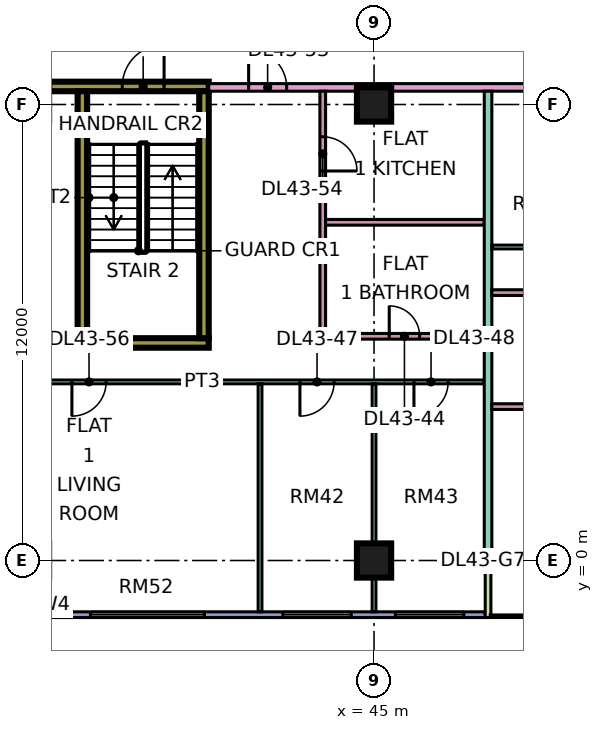
"""IFC4 building model, lengths in metres.
Left out: names, types, materials, properties, quantities, classifications, styles, units other than length and angle.
Written with IfcOpenShell. Run it as: python <this file> out.ifc"""

import sys

from ifc_helpers import new_model, si_unit, direction, frame, frame_2d, origin, origin_2d, place, context, subcontext, project, spatial, rectangle, extrude, element, fill, save


model = new_model("IFC4")
c1 = context("Model", 3, precision=1e-05, world=origin(), true_north=direction((0.0, 1.0)))
c2 = subcontext(c1, "Body", "Model", "MODEL_VIEW")
j1 = project(units=[si_unit("LENGTHUNIT", "METRE"), si_unit("PLANEANGLEUNIT", "RADIAN")], contexts=[c1])
p1 = place(None, origin())
s1 = spatial("IfcSite", under=j1, at=p1, CompositionType="ELEMENT")
p2 = place(p1, origin())
s2 = spatial("IfcBuilding", under=s1, at=p2, CompositionType="ELEMENT")
p3 = place(p2, frame((0.0, 0.0, 187.4)))
s3 = spatial("IfcBuildingStorey", under=s2, at=p3, CompositionType="ELEMENT", Elevation=187.4)
for number, where, z_axis, x_axis in (
    (1, (45.0, 0.0, 0.0), (0.0, 0.0, 1.0), (1.0, 0.0, 0.0)),
    (2, (45.0, 12.0, 0.0), (0.0, 0.0, 1.0), (1.0, 0.0, 0.0)),
):
    element("IfcColumn", number, at=place(p3, frame(where, z_axis=z_axis, x_axis=x_axis)), inside=s3, PredefinedType="COLUMN", context=c2, shape_type="SweptSolid", body=[
        extrude(rectangle(XDim=0.9, YDim=0.9, at=origin_2d()), origin(), (0.0, 0.0, 1.0), 3.75),
    ])
p4 = place(p3, frame((37.2, 5.725, 0.0), z_axis=(0.0, 0.0, 1.0), x_axis=(1.0, 0.0, 0.0)))
e3 = element("IfcWall", 3, at=p4, inside=s3, PredefinedType="SHEAR", context=c2, shape_type="SweptSolid", body=[
    extrude(rectangle(XDim=3.45, YDim=0.25, at=frame_2d((1.725, 0.0))), origin(), (0.0, 0.0, 1.0), 3.75),
])
p5 = place(p3, frame((36.45, 12.475, 0.0), z_axis=(0.0, 0.0, 1.0), x_axis=(1.0, 0.0, 0.0)))
e4 = element("IfcWall", 4, at=p5, inside=s3, PredefinedType="SHEAR", context=c2, shape_type="SweptSolid", body=[
    extrude(rectangle(XDim=4.2, YDim=0.25, at=frame_2d((2.1, 0.0))), origin(), (0.0, 0.0, 1.0), 3.75),
])
p6 = place(p5, frame((1.925, 0.0, 0.0)))
e5 = element("IfcOpeningElement", 5, at=p6, cuts=e4, PredefinedType="OPENING", context=c2, shape_type="SweptSolid", body=[
    extrude(rectangle(XDim=1.1, YDim=2.2, at=frame_2d((0.55, 1.1))), frame((0.0, 0.135, 0.0), z_axis=(0.0, -1.0, 0.0), x_axis=(1.0, 0.0, 0.0)), (0.0, 0.0, 1.0), 0.27),
])
for number, where, z_axis, x_axis in (
    (6, (37.325, 5.85, 0.0), (0.0, 0.0, 1.0), (0.0, 1.0, 0.0)),
    (7, (40.525, 5.85, 0.0), (0.0, 0.0, 1.0), (0.0, 1.0, 0.0)),
):
    element("IfcWall", number, at=place(p3, frame(where, z_axis=z_axis, x_axis=x_axis)), inside=s3, PredefinedType="SHEAR", context=c2, shape_type="SweptSolid", body=[
        extrude(rectangle(XDim=6.5, YDim=0.25, at=frame_2d((3.25, 0.0))), origin(), (0.0, 0.0, 1.0), 3.75),
    ])
p7 = place(p3, frame((36.075, -1.425, 0.0), z_axis=(0.0, 0.0, 1.0), x_axis=(1.0, 0.0, 0.0)))
e8 = element("IfcWall", 8, at=p7, inside=s3, PredefinedType="SOLIDWALL", context=c2, shape_type="SweptSolid", body=[
    extrude(rectangle(XDim=11.85, YDim=0.15, at=frame_2d((5.925, 0.0))), origin(), (0.0, 0.0, 1.0), 3.35),
])
p8 = place(p7, frame((1.462, 0.0, 0.45)))
e9 = element("IfcOpeningElement", 9, at=p8, cuts=e8, PredefinedType="OPENING", context=c2, shape_type="SweptSolid", body=[
    extrude(rectangle(XDim=3.0, YDim=2.4, at=frame_2d((1.5, 1.2))), frame((0.0, 0.085, 0.0), z_axis=(0.0, -1.0, 0.0), x_axis=(1.0, 0.0, 0.0)), (0.0, 0.0, 1.0), 0.17),
])
p9 = place(p7, frame((6.525, 0.0, 0.45)))
e10 = element("IfcOpeningElement", 10, at=p9, cuts=e8, PredefinedType="OPENING", context=c2, shape_type="SweptSolid", body=[
    extrude(rectangle(XDim=1.8, YDim=2.4, at=frame_2d((0.9, 1.2))), frame((0.0, 0.085, 0.0), z_axis=(0.0, -1.0, 0.0), x_axis=(1.0, 0.0, 0.0)), (0.0, 0.0, 1.0), 0.17),
])
p10 = place(p7, frame((9.488, 0.0, 0.45)))
e11 = element("IfcOpeningElement", 11, at=p10, cuts=e8, PredefinedType="OPENING", context=c2, shape_type="SweptSolid", body=[
    extrude(rectangle(XDim=1.8, YDim=2.4, at=frame_2d((0.9, 1.2))), frame((0.0, 0.085, 0.0), z_axis=(0.0, -1.0, 0.0), x_axis=(1.0, 0.0, 0.0)), (0.0, 0.0, 1.0), 0.17),
])
p11 = place(p3, frame((48.075, 0.0, 0.0), z_axis=(0.0, 0.0, 1.0), x_axis=(1.0, 0.0, 0.0)))
e12 = element("IfcWall", 12, at=p11, inside=s3, PredefinedType="SOLIDWALL", context=c2, shape_type="SweptSolid", body=[
    extrude(rectangle(XDim=13.35, YDim=0.15, at=frame_2d((6.675, 0.0))), origin(), (0.0, 0.0, 1.0), 3.35),
])
p12 = place(p11, frame((1.788, 0.0, 0.0)))
e13 = element("IfcOpeningElement", 13, at=p12, cuts=e12, PredefinedType="OPENING", context=c2, shape_type="SweptSolid", body=[
    extrude(rectangle(XDim=1.8, YDim=2.4, at=frame_2d((0.9, 1.2))), frame((0.0, 0.085, 0.0), z_axis=(0.0, -1.0, 0.0), x_axis=(1.0, 0.0, 0.0)), (0.0, 0.0, 1.0), 0.17),
])
p13 = place(p11, frame((7.7, 0.0, 0.45)))
e14 = element("IfcOpeningElement", 14, at=p13, cuts=e12, PredefinedType="OPENING", context=c2, shape_type="SweptSolid", body=[
    extrude(rectangle(XDim=3.0, YDim=2.4, at=frame_2d((1.5, 1.2))), frame((0.0, 0.085, 0.0), z_axis=(0.0, -1.0, 0.0), x_axis=(1.0, 0.0, 0.0)), (0.0, 0.0, 1.0), 0.17),
])
p14 = place(p11, frame((12.188, 0.0, 0.45)))
e15 = element("IfcOpeningElement", 15, at=p14, cuts=e12, PredefinedType="OPENING", context=c2, shape_type="SweptSolid", body=[
    extrude(rectangle(XDim=0.9, YDim=2.4, at=frame_2d((0.45, 1.2))), frame((0.0, 0.085, 0.0), z_axis=(0.0, -1.0, 0.0), x_axis=(1.0, 0.0, 0.0)), (0.0, 0.0, 1.0), 0.17),
])
p15 = place(p3, frame((48.0, -1.5, 0.0), z_axis=(0.0, 0.0, 1.0), x_axis=(0.0, 1.0, 0.0)))
e16 = element("IfcWall", 16, at=p15, inside=s3, PredefinedType="SOLIDWALL", context=c2, shape_type="SweptSolid", body=[
    extrude(rectangle(XDim=1.5, YDim=0.15, at=frame_2d((0.75, 0.0))), origin(), (0.0, 0.0, 1.0), 3.35),
])
p16 = place(p3, frame((33.05, 4.7, 0.0), z_axis=(0.0, 0.0, 1.0), x_axis=(1.0, 0.0, 0.0)))
e17 = element("IfcWall", 17, at=p16, inside=s3, PredefinedType="PARTITIONING", context=c2, shape_type="SweptSolid", body=[
    extrude(rectangle(XDim=14.85, YDim=0.1, at=frame_2d((7.425, 0.0))), origin(), (0.0, 0.0, 1.0), 3.35),
])
p17 = place(p16, frame((10.0, 0.0, 0.0)))
e18 = element("IfcOpeningElement", 18, at=p17, cuts=e17, PredefinedType="OPENING", context=c2, shape_type="SweptSolid", body=[
    extrude(rectangle(XDim=0.9, YDim=2.1, at=frame_2d((0.45, 1.05))), frame((0.0, 0.06, 0.0), z_axis=(0.0, -1.0, 0.0), x_axis=(1.0, 0.0, 0.0)), (0.0, 0.0, 1.0), 0.12),
])
p18 = place(p16, frame((13.0, 0.0, 0.0)))
e19 = element("IfcOpeningElement", 19, at=p18, cuts=e17, PredefinedType="OPENING", context=c2, shape_type="SweptSolid", body=[
    extrude(rectangle(XDim=0.9, YDim=2.1, at=frame_2d((0.45, 1.05))), frame((0.0, 0.06, 0.0), z_axis=(0.0, -1.0, 0.0), x_axis=(1.0, 0.0, 0.0)), (0.0, 0.0, 1.0), 0.12),
])
p19 = place(p16, frame((4.0, 0.0, 0.0)))
e20 = element("IfcOpeningElement", 20, at=p19, cuts=e17, PredefinedType="OPENING", context=c2, shape_type="SweptSolid", body=[
    extrude(rectangle(XDim=0.9, YDim=2.1, at=frame_2d((0.45, 1.05))), frame((0.0, 0.06, 0.0), z_axis=(0.0, -1.0, 0.0), x_axis=(1.0, 0.0, 0.0)), (0.0, 0.0, 1.0), 0.12),
])
p20 = place(p3, frame((40.65, 12.45, 0.0), z_axis=(0.0, 0.0, 1.0), x_axis=(1.0, 0.0, 0.0)))
e21 = element("IfcWall", 21, at=p20, inside=s3, PredefinedType="PARTITIONING", context=c2, shape_type="SweptSolid", body=[
    extrude(rectangle(XDim=22.35, YDim=0.2, at=frame_2d((11.175, 0.0))), origin(), (0.0, 0.0, 1.0), 3.35),
])
p21 = place(p20, frame((10.8, 0.0, 0.0)))
e22 = element("IfcOpeningElement", 22, at=p21, cuts=e21, PredefinedType="OPENING", context=c2, shape_type="SweptSolid", body=[
    extrude(rectangle(XDim=1.0, YDim=2.1, at=frame_2d((0.5, 1.05))), frame((0.0, 0.11, 0.0), z_axis=(0.0, -1.0, 0.0), x_axis=(1.0, 0.0, 0.0)), (0.0, 0.0, 1.0), 0.22),
])
p22 = place(p20, frame((1.05, 0.0, 0.0)))
e23 = element("IfcOpeningElement", 23, at=p22, cuts=e21, PredefinedType="OPENING", context=c2, shape_type="SweptSolid", body=[
    extrude(rectangle(XDim=1.0, YDim=2.1, at=frame_2d((0.5, 1.05))), frame((0.0, 0.11, 0.0), z_axis=(0.0, -1.0, 0.0), x_axis=(1.0, 0.0, 0.0)), (0.0, 0.0, 1.0), 0.22),
])
p23 = place(p3, frame((42.0, -1.35, 0.0), z_axis=(0.0, 0.0, 1.0), x_axis=(0.0, 1.0, 0.0)))
e24 = element("IfcWall", 24, at=p23, inside=s3, PredefinedType="PARTITIONING", context=c2, shape_type="SweptSolid", body=[
    extrude(rectangle(XDim=6.0, YDim=0.1, at=frame_2d((3.0, 0.0))), origin(), (0.0, 0.0, 1.0), 3.35),
])
p24 = place(p3, frame((43.65, 5.825, 0.0), z_axis=(0.0, 0.0, 1.0), x_axis=(0.0, 1.0, 0.0)))
e25 = element("IfcWall", 25, at=p24, inside=s3, PredefinedType="PARTITIONING", context=c2, shape_type="SweptSolid", body=[
    extrude(rectangle(XDim=6.525, YDim=0.15, at=frame_2d((3.263, 0.0))), origin(), (0.0, 0.0, 1.0), 3.35),
])
p25 = place(p24, frame((4.425, 0.0, 0.0)))
e26 = element("IfcOpeningElement", 26, at=p25, cuts=e25, PredefinedType="OPENING", context=c2, shape_type="SweptSolid", body=[
    extrude(rectangle(XDim=0.9, YDim=2.1, at=frame_2d((0.45, 1.05))), frame((0.0, 0.085, 0.0), z_axis=(0.0, -1.0, 0.0), x_axis=(1.0, 0.0, 0.0)), (0.0, 0.0, 1.0), 0.17),
])
p26 = place(p3, frame((43.725, 5.9, 0.0), z_axis=(0.0, 0.0, 1.0), x_axis=(1.0, 0.0, 0.0)))
e27 = element("IfcWall", 27, at=p26, inside=s3, PredefinedType="PARTITIONING", context=c2, shape_type="SweptSolid", body=[
    extrude(rectangle(XDim=4.175, YDim=0.15, at=frame_2d((2.087, 0.0))), origin(), (0.0, 0.0, 1.0), 3.35),
])
p27 = place(p26, frame((1.675, 0.0, 0.0)))
e28 = element("IfcOpeningElement", 28, at=p27, cuts=e27, PredefinedType="OPENING", context=c2, shape_type="SweptSolid", body=[
    extrude(rectangle(XDim=0.8, YDim=2.1, at=frame_2d((0.4, 1.05))), frame((0.0, 0.085, 0.0), z_axis=(0.0, -1.0, 0.0), x_axis=(1.0, 0.0, 0.0)), (0.0, 0.0, 1.0), 0.17),
])
p28 = place(p3, frame((43.725, 8.9, 0.0), z_axis=(0.0, 0.0, 1.0), x_axis=(1.0, 0.0, 0.0)))
e29 = element("IfcWall", 29, at=p28, inside=s3, PredefinedType="PARTITIONING", context=c2, shape_type="SweptSolid", body=[
    extrude(rectangle(XDim=4.175, YDim=0.15, at=frame_2d((2.087, 0.0))), origin(), (0.0, 0.0, 1.0), 3.35),
])
p29 = place(p3, frame((45.0, -1.351, 0.0), z_axis=(0.0, 0.0, 1.0), x_axis=(0.0, 1.0, 0.0)))
e30 = element("IfcWall", 30, at=p29, inside=s3, PredefinedType="PARTITIONING", context=c2, shape_type="SweptSolid", body=[
    extrude(rectangle(XDim=6.001, YDim=0.1, at=frame_2d((3.0, 0.0))), origin(), (0.0, 0.0, 1.0), 3.35),
])
p30 = place(p3, frame((48.0, 0.0, 0.0), z_axis=(0.0, 0.0, 1.0), x_axis=(0.0, 1.0, 0.0)))
e31 = element("IfcWall", 31, at=p30, inside=s3, PredefinedType="PARTITIONING", context=c2, shape_type="SweptSolid", body=[
    extrude(rectangle(XDim=12.35, YDim=0.2, at=frame_2d((6.175, 0.0))), origin(), (0.0, 0.0, 1.0), 3.35),
])
p31 = place(p3, frame((48.1, 4.05, 0.0), z_axis=(0.0, 0.0, 1.0), x_axis=(1.0, 0.0, 0.0)))
e32 = element("IfcWall", 32, at=p31, inside=s3, PredefinedType="PARTITIONING", context=c2, shape_type="SweptSolid", body=[
    extrude(rectangle(XDim=2.825, YDim=0.15, at=frame_2d((1.413, 0.0))), origin(), (0.0, 0.0, 1.0), 3.35),
])
p32 = place(p3, frame((48.1, 7.05, 0.0), z_axis=(0.0, 0.0, 1.0), x_axis=(1.0, 0.0, 0.0)))
e33 = element("IfcWall", 33, at=p32, inside=s3, PredefinedType="PARTITIONING", context=c2, shape_type="SweptSolid", body=[
    extrude(rectangle(XDim=5.95, YDim=0.15, at=frame_2d((2.975, 0.0))), origin(), (0.0, 0.0, 1.0), 3.35),
])
p33 = place(p32, frame((3.95, 0.0, 0.0)))
e34 = element("IfcOpeningElement", 34, at=p33, cuts=e33, PredefinedType="OPENING", context=c2, shape_type="SweptSolid", body=[
    extrude(rectangle(XDim=0.9, YDim=2.1, at=frame_2d((0.45, 1.05))), frame((0.0, 0.085, 0.0), z_axis=(0.0, -1.0, 0.0), x_axis=(1.0, 0.0, 0.0)), (0.0, 0.0, 1.0), 0.17),
])
p34 = place(p3, frame((48.1, 8.25, 0.0), z_axis=(0.0, 0.0, 1.0), x_axis=(1.0, 0.0, 0.0)))
e35 = element("IfcWall", 35, at=p34, inside=s3, PredefinedType="PARTITIONING", context=c2, shape_type="SweptSolid", body=[
    extrude(rectangle(XDim=2.25, YDim=0.1, at=frame_2d((1.125, 0.0))), origin(), (0.0, 0.0, 1.0), 3.35),
])
p35 = place(p8, origin())
e36 = element("IfcWindow", 36, at=p35, inside=s3, PartitioningType="SINGLE_PANEL", PredefinedType="WINDOW", context=c2, shape_type="SweptSolid", body=[
    extrude(rectangle(XDim=3.0, YDim=2.4, at=frame_2d((1.5, 1.2))), frame((0.0, 0.03, 0.0), z_axis=(0.0, -1.0, 0.0), x_axis=(1.0, 0.0, 0.0)), (0.0, 0.0, 1.0), 0.06),
])
fill(e9, e36)
p36 = place(p9, origin())
e37 = element("IfcWindow", 37, at=p36, inside=s3, PartitioningType="SINGLE_PANEL", PredefinedType="WINDOW", context=c2, shape_type="SweptSolid", body=[
    extrude(rectangle(XDim=1.8, YDim=2.4, at=frame_2d((0.9, 1.2))), frame((0.0, 0.03, 0.0), z_axis=(0.0, -1.0, 0.0), x_axis=(1.0, 0.0, 0.0)), (0.0, 0.0, 1.0), 0.06),
])
fill(e10, e37)
p37 = place(p10, origin())
e38 = element("IfcWindow", 38, at=p37, inside=s3, PartitioningType="SINGLE_PANEL", PredefinedType="WINDOW", context=c2, shape_type="SweptSolid", body=[
    extrude(rectangle(XDim=1.8, YDim=2.4, at=frame_2d((0.9, 1.2))), frame((0.0, 0.03, 0.0), z_axis=(0.0, -1.0, 0.0), x_axis=(1.0, 0.0, 0.0)), (0.0, 0.0, 1.0), 0.06),
])
fill(e11, e38)
p38 = place(p6, frame((1.1, 0.0, 0.0), z_axis=(0.0, 0.0, 1.0), x_axis=(-1.0, 0.0, 0.0)))
e39 = element("IfcDoor", 39, at=p38, inside=s3, OperationType="SINGLE_SWING_RIGHT", PredefinedType="DOOR", context=c2, shape_type="SweptSolid", body=[
    extrude(rectangle(XDim=1.1, YDim=2.2, at=frame_2d((0.55, 1.1))), frame((0.0, 0.025, 0.0), z_axis=(0.0, -1.0, 0.0), x_axis=(1.0, 0.0, 0.0)), (0.0, 0.0, 1.0), 0.05),
])
fill(e5, e39)
p39 = place(p27, origin())
e40 = element("IfcDoor", 40, at=p39, inside=s3, OperationType="SINGLE_SWING_LEFT", PredefinedType="DOOR", context=c2, shape_type="SweptSolid", body=[
    extrude(rectangle(XDim=0.8, YDim=2.1, at=frame_2d((0.4, 1.05))), frame((0.0, 0.025, 0.0), z_axis=(0.0, -1.0, 0.0), x_axis=(1.0, 0.0, 0.0)), (0.0, 0.0, 1.0), 0.05),
])
fill(e28, e40)
p40 = place(p17, frame((0.9, 0.0, 0.0), z_axis=(0.0, 0.0, 1.0), x_axis=(-1.0, 0.0, 0.0)))
e41 = element("IfcDoor", 41, at=p40, inside=s3, OperationType="SINGLE_SWING_LEFT", PredefinedType="DOOR", context=c2, shape_type="SweptSolid", body=[
    extrude(rectangle(XDim=0.9, YDim=2.1, at=frame_2d((0.45, 1.05))), frame((0.0, 0.025, 0.0), z_axis=(0.0, -1.0, 0.0), x_axis=(1.0, 0.0, 0.0)), (0.0, 0.0, 1.0), 0.05),
])
fill(e18, e41)
p41 = place(p18, frame((0.9, 0.0, 0.0), z_axis=(0.0, 0.0, 1.0), x_axis=(-1.0, 0.0, 0.0)))
e42 = element("IfcDoor", 42, at=p41, inside=s3, OperationType="SINGLE_SWING_LEFT", PredefinedType="DOOR", context=c2, shape_type="SweptSolid", body=[
    extrude(rectangle(XDim=0.9, YDim=2.1, at=frame_2d((0.45, 1.05))), frame((0.0, 0.025, 0.0), z_axis=(0.0, -1.0, 0.0), x_axis=(1.0, 0.0, 0.0)), (0.0, 0.0, 1.0), 0.05),
])
fill(e19, e42)
p42 = place(p22, origin())
e43 = element("IfcDoor", 43, at=p42, inside=s3, OperationType="SINGLE_SWING_LEFT", PredefinedType="DOOR", context=c2, shape_type="SweptSolid", body=[
    extrude(rectangle(XDim=1.0, YDim=2.1, at=frame_2d((0.5, 1.05))), frame((0.0, 0.025, 0.0), z_axis=(0.0, -1.0, 0.0), x_axis=(1.0, 0.0, 0.0)), (0.0, 0.0, 1.0), 0.05),
])
fill(e23, e43)
p43 = place(p25, frame((0.9, 0.0, 0.0), z_axis=(0.0, 0.0, 1.0), x_axis=(-1.0, 0.0, 0.0)))
e44 = element("IfcDoor", 44, at=p43, inside=s3, OperationType="SINGLE_SWING_LEFT", PredefinedType="DOOR", context=c2, shape_type="SweptSolid", body=[
    extrude(rectangle(XDim=0.9, YDim=2.1, at=frame_2d((0.45, 1.05))), frame((0.0, 0.025, 0.0), z_axis=(0.0, -1.0, 0.0), x_axis=(1.0, 0.0, 0.0)), (0.0, 0.0, 1.0), 0.05),
])
fill(e26, e44)
p44 = place(p19, frame((0.9, 0.0, 0.0), z_axis=(0.0, 0.0, 1.0), x_axis=(-1.0, 0.0, 0.0)))
e45 = element("IfcDoor", 45, at=p44, inside=s3, OperationType="SINGLE_SWING_LEFT", PredefinedType="DOOR", context=c2, shape_type="SweptSolid", body=[
    extrude(rectangle(XDim=0.9, YDim=2.1, at=frame_2d((0.45, 1.05))), frame((0.0, 0.025, 0.0), z_axis=(0.0, -1.0, 0.0), x_axis=(1.0, 0.0, 0.0)), (0.0, 0.0, 1.0), 0.05),
])
fill(e20, e45)
save(model, sys.argv[1])
